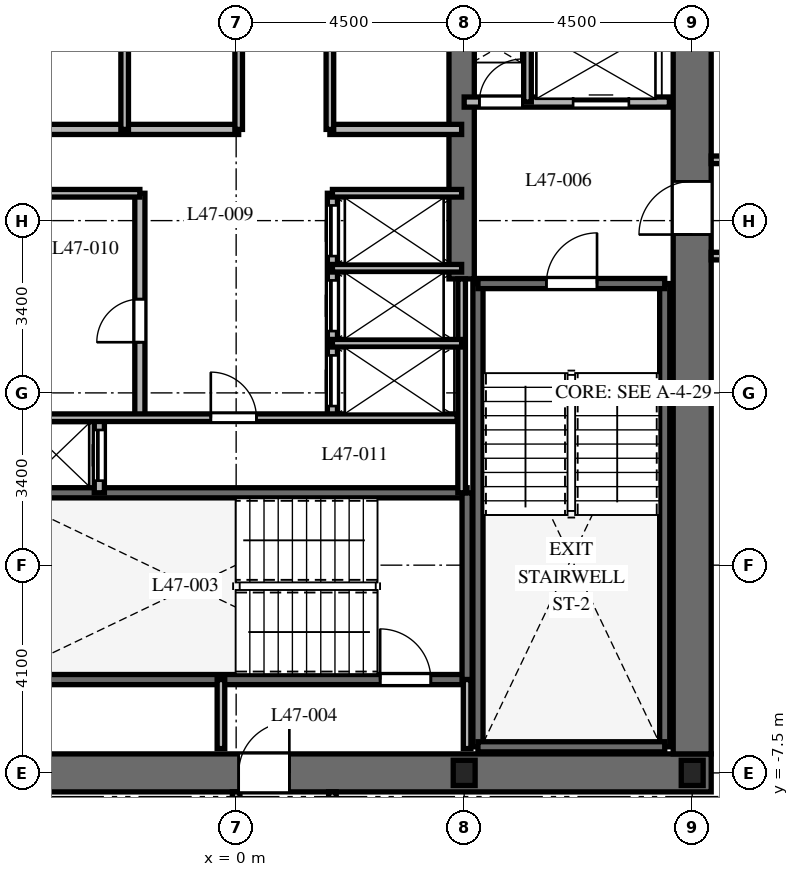
"""IFC4 building model, lengths in metres.
Left out: names, types, materials, properties, quantities, classifications, styles, units other than length and angle.
Written with IfcOpenShell. Run it as: python <this file> out.ifc"""

import sys

from ifc_helpers import new_model, si_unit, direction, frame, frame_2d, origin, origin_2d, place, context, subcontext, project, spatial, rectangle, i_section, extrude, element, fill, save


model = new_model("IFC4")
c1 = context("Model", 3, precision=1e-05, world=origin(), true_north=direction((0.0, 1.0)))
c2 = subcontext(c1, "Body", "Model", "MODEL_VIEW")
j1 = project(units=[si_unit("LENGTHUNIT", "METRE"), si_unit("PLANEANGLEUNIT", "RADIAN")], contexts=[c1])
p1 = place(None, origin())
s1 = spatial("IfcSite", under=j1, at=p1, CompositionType="ELEMENT")
p2 = place(p1, origin())
s2 = spatial("IfcBuilding", under=s1, at=p2, CompositionType="ELEMENT")
p3 = place(p2, frame((0.0, 0.0, 190.4)))
s3 = spatial("IfcBuildingStorey", under=s2, at=p3, CompositionType="ELEMENT", Elevation=190.4)
p4 = place(p3, frame((-9.375, -7.5, 0.0), z_axis=(0.0, 0.0, 1.0), x_axis=(1.0, 0.0, 0.0)))
e1 = element("IfcWall", 1, at=p4, inside=s3, PredefinedType="SHEAR", context=c2, shape_type="SweptSolid", body=[
    extrude(rectangle(XDim=18.75, YDim=0.75, at=frame_2d((9.375, 0.0))), origin(), (0.0, 0.0, 1.0), 3.7),
])
p5 = place(p4, frame((9.425, 0.0, 0.0)))
e2 = element("IfcOpeningElement", 2, at=p5, cuts=e1, PredefinedType="OPENING", context=c2, shape_type="SweptSolid", body=[
    extrude(rectangle(XDim=1.0, YDim=2.15, at=frame_2d((0.5, 1.075))), frame((0.0, 0.385, 0.0), z_axis=(0.0, -1.0, 0.0), x_axis=(1.0, 0.0, 0.0)), (0.0, 0.0, 1.0), 0.77),
])
p6 = place(p3, frame((9.0, -7.125, 0.0), z_axis=(0.0, 0.0, 1.0), x_axis=(0.0, 1.0, 0.0)))
e3 = element("IfcWall", 3, at=p6, inside=s3, PredefinedType="SHEAR", context=c2, shape_type="SweptSolid", body=[
    extrude(rectangle(XDim=14.25, YDim=0.75, at=frame_2d((7.125, 0.0))), origin(), (0.0, 0.0, 1.0), 3.7),
])
p7 = place(p6, frame((10.25, 0.0, 0.0)))
e4 = element("IfcOpeningElement", 4, at=p7, cuts=e3, PredefinedType="OPENING", context=c2, shape_type="SweptSolid", body=[
    extrude(rectangle(XDim=1.05, YDim=2.15, at=frame_2d((0.525, 1.075))), frame((0.0, 0.385, 0.0), z_axis=(0.0, -1.0, 0.0), x_axis=(1.0, 0.0, 0.0)), (0.0, 0.0, 1.0), 0.77),
])
p8 = place(p3, frame((4.45, 2.25, 0.0), z_axis=(0.0, 0.0, 1.0), x_axis=(0.0, 1.0, 0.0)))
e5 = element("IfcWall", 5, at=p8, inside=s3, PredefinedType="SHEAR", context=c2, shape_type="SweptSolid", body=[
    extrude(rectangle(XDim=4.875, YDim=0.5, at=frame_2d((2.438, 0.0))), origin(), (0.0, 0.0, 1.0), 3.7),
])
for number, where, z_axis, x_axis in (
    (6, (4.772, -6.985, 0.0), (0.0, 0.0, 1.0), (0.0, 1.0, 0.0)),
    (7, (8.458, -6.985, 0.0), (0.0, 0.0, 1.0), (0.0, 1.0, 0.0)),
):
    element("IfcWall", number, at=place(p3, frame(where, z_axis=z_axis, x_axis=x_axis)), inside=s3, PredefinedType="SHEAR", context=c2, shape_type="SweptSolid", body=[
        extrude(rectangle(XDim=9.143, YDim=0.2, at=frame_2d((4.572, 0.0))), origin(), (0.0, 0.0, 1.0), 3.7),
    ])
p9 = place(p3, frame((4.772, -6.985, 0.0), z_axis=(0.0, 0.0, 1.0), x_axis=(1.0, 0.0, 0.0)))
e8 = element("IfcWall", 8, at=p9, inside=s3, PredefinedType="SHEAR", context=c2, shape_type="SweptSolid", body=[
    extrude(rectangle(XDim=3.686, YDim=0.2, at=frame_2d((1.843, 0.0))), origin(), (0.0, 0.0, 1.0), 3.7),
])
p10 = place(p3, frame((4.772, 2.158, 0.0), z_axis=(0.0, 0.0, 1.0), x_axis=(1.0, 0.0, 0.0)))
e9 = element("IfcWall", 9, at=p10, inside=s3, PredefinedType="SHEAR", context=c2, shape_type="SweptSolid", body=[
    extrude(rectangle(XDim=3.686, YDim=0.2, at=frame_2d((1.843, 0.0))), origin(), (0.0, 0.0, 1.0), 3.7),
])
p11 = place(p10, frame((1.35, 0.0, 0.0)))
e10 = element("IfcOpeningElement", 10, at=p11, cuts=e9, PredefinedType="OPENING", context=c2, shape_type="SweptSolid", body=[
    extrude(rectangle(XDim=1.0, YDim=2.15, at=frame_2d((0.5, 1.075))), frame((0.0, 0.11, 0.0), z_axis=(0.0, -1.0, 0.0), x_axis=(1.0, 0.0, 0.0)), (0.0, 0.0, 1.0), 0.22),
])
p12 = place(p3, frame((-4.608, -5.658, 0.0), z_axis=(0.0, 0.0, 1.0), x_axis=(1.0, 0.0, 0.0)))
e11 = element("IfcWall", 11, at=p12, inside=s3, PredefinedType="SHEAR", context=c2, shape_type="SweptSolid", body=[
    extrude(rectangle(XDim=9.166, YDim=0.2, at=frame_2d((4.583, 0.0))), origin(), (0.0, 0.0, 1.0), 3.7),
])
p13 = place(p12, frame((7.45, 0.0, 0.0)))
e12 = element("IfcOpeningElement", 12, at=p13, cuts=e11, PredefinedType="OPENING", context=c2, shape_type="SweptSolid", body=[
    extrude(rectangle(XDim=1.0, YDim=2.15, at=frame_2d((0.5, 1.075))), frame((0.0, 0.11, 0.0), z_axis=(0.0, -1.0, 0.0), x_axis=(1.0, 0.0, 0.0)), (0.0, 0.0, 1.0), 0.22),
])
p14 = place(p3, frame((-4.608, -1.972, 0.0), z_axis=(0.0, 0.0, 1.0), x_axis=(1.0, 0.0, 0.0)))
e13 = element("IfcWall", 13, at=p14, inside=s3, PredefinedType="SHEAR", context=c2, shape_type="SweptSolid", body=[
    extrude(rectangle(XDim=9.166, YDim=0.2, at=frame_2d((4.583, 0.0))), origin(), (0.0, 0.0, 1.0), 3.7),
])
p15 = place(p3, frame((4.558, -5.658, 0.0), z_axis=(0.0, 0.0, 1.0), x_axis=(0.0, 1.0, 0.0)))
e14 = element("IfcWall", 14, at=p15, inside=s3, PredefinedType="SHEAR", context=c2, shape_type="SweptSolid", body=[
    extrude(rectangle(XDim=3.686, YDim=0.2, at=frame_2d((1.843, 0.0))), origin(), (0.0, 0.0, 1.0), 3.7),
])
for number, where, z_axis, x_axis in (
    (15, (4.5, -7.5, 0.0), (0.0, 0.0, 1.0), (1.0, 0.0, 0.0)),
    (16, (9.0, -7.5, 0.0), (0.0, 0.0, 1.0), (1.0, 0.0, 0.0)),
):
    element("IfcColumn", number, at=place(p3, frame(where, z_axis=z_axis, x_axis=x_axis)), inside=s3, PredefinedType="COLUMN", context=c2, shape_type="SweptSolid", body=[
        extrude(i_section(OverallWidth=0.432, OverallDepth=0.498, WebThickness=0.056, FlangeThickness=0.089, at=origin_2d()), origin(), (0.0, 0.0, 1.0), 3.7),
    ])
for number, where, z_axis, x_axis in (
    (17, (-0.3, -7.02, 0.0), (0.0, 0.0, 1.0), (0.0, 1.0, 0.0)),
    (18, (4.558, -7.02, 0.0), (0.0, 0.0, 1.0), (0.0, 1.0, 0.0)),
):
    element("IfcWall", number, at=place(p3, frame(where, z_axis=z_axis, x_axis=x_axis)), inside=s3, PredefinedType="PARTITIONING", context=c2, shape_type="SweptSolid", body=[
        extrude(rectangle(XDim=1.362, YDim=0.15, at=frame_2d((0.681, 0.0))), origin(), (0.0, 0.0, 1.0), 3.4),
    ])
p16 = place(p3, frame((4.5, 5.74, 0.0), z_axis=(0.0, 0.0, 1.0), x_axis=(1.0, 0.0, 0.0)))
e19 = element("IfcWall", 19, at=p16, inside=s3, PredefinedType="PARTITIONING", context=c2, shape_type="SweptSolid", body=[
    extrude(rectangle(XDim=4.05, YDim=0.2, at=frame_2d((2.025, 0.0))), origin(), (0.0, 0.0, 1.0), 3.4),
])
p17 = place(p16, frame((0.3, 0.0, 0.0)))
e20 = element("IfcOpeningElement", 20, at=p17, cuts=e19, PredefinedType="OPENING", context=c2, shape_type="SweptSolid", body=[
    extrude(rectangle(XDim=0.85, YDim=2.03, at=frame_2d((0.425, 1.015))), frame((0.0, 0.11, 0.0), z_axis=(0.0, -1.0, 0.0), x_axis=(1.0, 0.0, 0.0)), (0.0, 0.0, 1.0), 0.22),
])
p18 = place(p16, frame((2.15, 0.0, 0.0)))
e21 = element("IfcOpeningElement", 21, at=p18, cuts=e19, PredefinedType="OPENING", context=c2, shape_type="SweptSolid", body=[
    extrude(rectangle(XDim=1.1, YDim=2.2, at=frame_2d((0.55, 1.1))), frame((0.0, 0.11, 0.0), z_axis=(0.0, -1.0, 0.0), x_axis=(1.0, 0.0, 0.0)), (0.0, 0.0, 1.0), 0.22),
])
p19 = place(p3, frame((5.75, 5.74, 0.0), z_axis=(0.0, 0.0, 1.0), x_axis=(0.0, 1.0, 0.0)))
e22 = element("IfcWall", 22, at=p19, inside=s3, PredefinedType="PARTITIONING", context=c2, shape_type="SweptSolid", body=[
    extrude(rectangle(XDim=1.41, YDim=0.15, at=frame_2d((0.705, 0.0))), origin(), (0.0, 0.0, 1.0), 3.4),
])
p20 = place(p3, frame((-2.7, -1.972, 0.0), z_axis=(0.0, 0.0, 1.0), x_axis=(0.0, 1.0, 0.0)))
e23 = element("IfcWall", 23, at=p20, inside=s3, PredefinedType="PARTITIONING", context=c2, shape_type="SweptSolid", body=[
    extrude(rectangle(XDim=1.472, YDim=0.2, at=frame_2d((0.736, 0.0))), origin(), (0.0, 0.0, 1.0), 3.4),
])
p21 = place(p20, frame((0.24, 0.0, 0.0)))
e24 = element("IfcOpeningElement", 24, at=p21, cuts=e23, PredefinedType="OPENING", context=c2, shape_type="SweptSolid", body=[
    extrude(rectangle(XDim=1.0, YDim=2.2, at=frame_2d((0.5, 1.1))), frame((0.0, 0.11, 0.0), z_axis=(0.0, -1.0, 0.0), x_axis=(1.0, 0.0, 0.0)), (0.0, 0.0, 1.0), 0.22),
])
p22 = place(p3, frame((-4.45, 5.2, 0.0), z_axis=(0.0, 0.0, 1.0), x_axis=(1.0, 0.0, 0.0)))
e25 = element("IfcWall", 25, at=p22, inside=s3, PredefinedType="PARTITIONING", context=c2, shape_type="SweptSolid", body=[
    extrude(rectangle(XDim=4.5, YDim=0.2, at=frame_2d((2.25, 0.0))), origin(), (0.0, 0.0, 1.0), 3.4),
])
p23 = place(p3, frame((1.85, 5.2, 0.0), z_axis=(0.0, 0.0, 1.0), x_axis=(1.0, 0.0, 0.0)))
e26 = element("IfcWall", 26, at=p23, inside=s3, PredefinedType="PARTITIONING", context=c2, shape_type="SweptSolid", body=[
    extrude(rectangle(XDim=2.6, YDim=0.2, at=frame_2d((1.3, 0.0))), origin(), (0.0, 0.0, 1.0), 3.4),
])
p24 = place(p3, frame((-2.2, 5.2, 0.0), z_axis=(0.0, 0.0, 1.0), x_axis=(0.0, 1.0, 0.0)))
e27 = element("IfcWall", 27, at=p24, inside=s3, PredefinedType="PARTITIONING", context=c2, shape_type="SweptSolid", body=[
    extrude(rectangle(XDim=1.85, YDim=0.15, at=frame_2d((0.925, 0.0))), origin(), (0.0, 0.0, 1.0), 3.4),
])
for number, where, z_axis, x_axis in (
    (28, (0.05, 5.2, 0.0), (0.0, 0.0, 1.0), (0.0, 1.0, 0.0)),
    (29, (1.85, 5.2, 0.0), (0.0, 0.0, 1.0), (0.0, 1.0, 0.0)),
):
    element("IfcWall", number, at=place(p3, frame(where, z_axis=z_axis, x_axis=x_axis)), inside=s3, PredefinedType="PARTITIONING", context=c2, shape_type="SweptSolid", body=[
        extrude(rectangle(XDim=1.95, YDim=0.15, at=frame_2d((0.975, 0.0))), origin(), (0.0, 0.0, 1.0), 3.4),
    ])
p25 = place(p3, frame((4.45, -1.972, 0.0), z_axis=(0.0, 0.0, 1.0), x_axis=(0.0, 1.0, 0.0)))
e30 = element("IfcWall", 30, at=p25, inside=s3, PredefinedType="PARTITIONING", context=c2, shape_type="SweptSolid", body=[
    extrude(rectangle(XDim=4.222, YDim=0.15, at=frame_2d((2.111, 0.0))), origin(), (0.0, 0.0, 1.0), 3.4),
])
p26 = place(p3, frame((-1.9, -0.5, 0.0), z_axis=(0.0, 0.0, 1.0), x_axis=(0.0, 1.0, 0.0)))
e31 = element("IfcWall", 31, at=p26, inside=s3, PredefinedType="PARTITIONING", context=c2, shape_type="SweptSolid", body=[
    extrude(rectangle(XDim=4.44, YDim=0.2, at=frame_2d((2.22, 0.0))), origin(), (0.0, 0.0, 1.0), 3.4),
])
p27 = place(p26, frame((1.5, 0.0, 0.0)))
e32 = element("IfcOpeningElement", 32, at=p27, cuts=e31, PredefinedType="OPENING", context=c2, shape_type="SweptSolid", body=[
    extrude(rectangle(XDim=0.85, YDim=2.03, at=frame_2d((0.425, 1.015))), frame((0.0, 0.11, 0.0), z_axis=(0.0, -1.0, 0.0), x_axis=(1.0, 0.0, 0.0)), (0.0, 0.0, 1.0), 0.22),
])
p28 = place(p3, frame((-4.45, 3.94, 0.0), z_axis=(0.0, 0.0, 1.0), x_axis=(1.0, 0.0, 0.0)))
e33 = element("IfcWall", 33, at=p28, inside=s3, PredefinedType="PARTITIONING", context=c2, shape_type="SweptSolid", body=[
    extrude(rectangle(XDim=2.55, YDim=0.15, at=frame_2d((1.275, 0.0))), origin(), (0.0, 0.0, 1.0), 3.4),
])
p29 = place(p3, frame((1.9, -0.5, 0.0), z_axis=(0.0, 0.0, 1.0), x_axis=(0.0, 1.0, 0.0)))
e34 = element("IfcWall", 34, at=p29, inside=s3, PredefinedType="PARTITIONING", context=c2, shape_type="SweptSolid", body=[
    extrude(rectangle(XDim=4.44, YDim=0.2, at=frame_2d((2.22, 0.0))), origin(), (0.0, 0.0, 1.0), 3.4),
])
p30 = place(p29, frame((0.24, 0.0, 0.0)))
e35 = element("IfcOpeningElement", 35, at=p30, cuts=e34, PredefinedType="OPENING", context=c2, shape_type="SweptSolid", body=[
    extrude(rectangle(XDim=1.0, YDim=2.2, at=frame_2d((0.5, 1.1))), frame((0.0, 0.11, 0.0), z_axis=(0.0, -1.0, 0.0), x_axis=(1.0, 0.0, 0.0)), (0.0, 0.0, 1.0), 0.22),
])
p31 = place(p29, frame((1.72, 0.0, 0.0)))
e36 = element("IfcOpeningElement", 36, at=p31, cuts=e34, PredefinedType="OPENING", context=c2, shape_type="SweptSolid", body=[
    extrude(rectangle(XDim=1.0, YDim=2.2, at=frame_2d((0.5, 1.1))), frame((0.0, 0.11, 0.0), z_axis=(0.0, -1.0, 0.0), x_axis=(1.0, 0.0, 0.0)), (0.0, 0.0, 1.0), 0.22),
])
p32 = place(p29, frame((3.2, 0.0, 0.0)))
e37 = element("IfcOpeningElement", 37, at=p32, cuts=e34, PredefinedType="OPENING", context=c2, shape_type="SweptSolid", body=[
    extrude(rectangle(XDim=1.0, YDim=2.2, at=frame_2d((0.5, 1.1))), frame((0.0, 0.11, 0.0), z_axis=(0.0, -1.0, 0.0), x_axis=(1.0, 0.0, 0.0)), (0.0, 0.0, 1.0), 0.22),
])
for number, where, z_axis, x_axis in (
    (38, (1.9, 3.94, 0.0), (0.0, 0.0, 1.0), (1.0, 0.0, 0.0)),
    (39, (1.9, 0.98, 0.0), (0.0, 0.0, 1.0), (1.0, 0.0, 0.0)),
    (40, (1.9, 2.46, 0.0), (0.0, 0.0, 1.0), (1.0, 0.0, 0.0)),
):
    element("IfcWall", number, at=place(p3, frame(where, z_axis=z_axis, x_axis=x_axis)), inside=s3, PredefinedType="PARTITIONING", context=c2, shape_type="SweptSolid", body=[
        extrude(rectangle(XDim=2.55, YDim=0.15, at=frame_2d((1.275, 0.0))), origin(), (0.0, 0.0, 1.0), 3.4),
    ])
p33 = place(p3, frame((-4.36, -0.49, 0.0), z_axis=(0.0, 0.0, 1.0), x_axis=(1.0, 0.0, 0.0)))
e41 = element("IfcWall", 41, at=p33, inside=s3, PredefinedType="PARTITIONING", context=c2, shape_type="SweptSolid", body=[
    extrude(rectangle(XDim=8.72, YDim=0.15, at=frame_2d((4.36, 0.0))), origin(), (0.0, 0.0, 1.0), 3.4),
])
p34 = place(p33, frame((3.86, 0.0, 0.0)))
e42 = element("IfcOpeningElement", 42, at=p34, cuts=e41, PredefinedType="OPENING", context=c2, shape_type="SweptSolid", body=[
    extrude(rectangle(XDim=0.9, YDim=2.03, at=frame_2d((0.45, 1.015))), frame((0.0, 0.085, 0.0), z_axis=(0.0, -1.0, 0.0), x_axis=(1.0, 0.0, 0.0)), (0.0, 0.0, 1.0), 0.17),
])
p35 = place(p3, frame((11.55, 2.7, 0.0), z_axis=(0.0, 0.0, 1.0), x_axis=(-1.0, 0.0, 0.0)))
e43 = element("IfcWall", 43, at=p35, inside=s3, PredefinedType="PARTITIONING", context=c2, shape_type="SweptSolid", body=[
    extrude(rectangle(XDim=2.175, YDim=0.15, at=frame_2d((1.087, 0.0))), origin(), (0.0, 0.0, 1.0), 3.4),
])
p36 = place(p3, frame((9.375, 4.6, 0.0), z_axis=(0.0, 0.0, 1.0), x_axis=(1.0, 0.0, 0.0)))
e44 = element("IfcWall", 44, at=p36, inside=s3, PredefinedType="PARTITIONING", context=c2, shape_type="SweptSolid", body=[
    extrude(rectangle(XDim=2.175, YDim=0.15, at=frame_2d((1.087, 0.0))), origin(), (0.0, 0.0, 1.0), 3.4),
])
p37 = place(p36, frame((0.663, 0.0, 0.0)))
e45 = element("IfcOpeningElement", 45, at=p37, cuts=e44, PredefinedType="OPENING", context=c2, shape_type="SweptSolid", body=[
    extrude(rectangle(XDim=0.85, YDim=2.03, at=frame_2d((0.425, 1.015))), frame((0.0, 0.085, 0.0), z_axis=(0.0, -1.0, 0.0), x_axis=(1.0, 0.0, 0.0)), (0.0, 0.0, 1.0), 0.17),
])
for number, where, z_axis, x_axis in (
    (46, (0.0, -10.05, 0.0), (0.0, 0.0, 1.0), (0.0, 1.0, 0.0)),
    (47, (1.9, -7.875, 0.0), (0.0, 0.0, 1.0), (0.0, -1.0, 0.0)),
):
    element("IfcWall", number, at=place(p3, frame(where, z_axis=z_axis, x_axis=x_axis)), inside=s3, PredefinedType="PARTITIONING", context=c2, shape_type="SweptSolid", body=[
        extrude(rectangle(XDim=2.175, YDim=0.15, at=frame_2d((1.087, 0.0))), origin(), (0.0, 0.0, 1.0), 3.4),
    ])
p38 = place(p11, origin())
e48 = element("IfcDoor", 48, at=p38, inside=s3, OperationType="SINGLE_SWING_RIGHT", PredefinedType="DOOR", context=c2, shape_type="SweptSolid", body=[
    extrude(rectangle(XDim=1.0, YDim=2.15, at=frame_2d((0.5, 1.075))), frame((0.0, 0.025, 0.0), z_axis=(0.0, -1.0, 0.0), x_axis=(1.0, 0.0, 0.0)), (0.0, 0.0, 1.0), 0.05),
])
fill(e10, e48)
p39 = place(p13, origin())
e49 = element("IfcDoor", 49, at=p39, inside=s3, OperationType="SINGLE_SWING_LEFT", PredefinedType="DOOR", context=c2, shape_type="SweptSolid", body=[
    extrude(rectangle(XDim=1.0, YDim=2.15, at=frame_2d((0.5, 1.075))), frame((0.0, 0.025, 0.0), z_axis=(0.0, -1.0, 0.0), x_axis=(1.0, 0.0, 0.0)), (0.0, 0.0, 1.0), 0.05),
])
fill(e12, e49)
p40 = place(p5, origin())
e50 = element("IfcDoor", 50, at=p40, inside=s3, OperationType="SINGLE_SWING_RIGHT", PredefinedType="DOOR", context=c2, shape_type="SweptSolid", body=[
    extrude(rectangle(XDim=1.0, YDim=2.15, at=frame_2d((0.5, 1.075))), frame((0.0, 0.025, 0.0), z_axis=(0.0, -1.0, 0.0), x_axis=(1.0, 0.0, 0.0)), (0.0, 0.0, 1.0), 0.05),
])
fill(e2, e50)
p41 = place(p7, origin())
e51 = element("IfcDoor", 51, at=p41, inside=s3, OperationType="SINGLE_SWING_LEFT", PredefinedType="DOOR", context=c2, shape_type="SweptSolid", body=[
    extrude(rectangle(XDim=1.05, YDim=2.15, at=frame_2d((0.525, 1.075))), frame((0.0, 0.025, 0.0), z_axis=(0.0, -1.0, 0.0), x_axis=(1.0, 0.0, 0.0)), (0.0, 0.0, 1.0), 0.05),
])
fill(e4, e51)
p42 = place(p17, origin())
e52 = element("IfcDoor", 52, at=p42, inside=s3, OperationType="SINGLE_SWING_RIGHT", PredefinedType="DOOR", context=c2, shape_type="SweptSolid", body=[
    extrude(rectangle(XDim=0.85, YDim=2.03, at=frame_2d((0.425, 1.015))), frame((0.0, 0.025, 0.0), z_axis=(0.0, -1.0, 0.0), x_axis=(1.0, 0.0, 0.0)), (0.0, 0.0, 1.0), 0.05),
])
fill(e20, e52)
p43 = place(p18, origin())
e53 = element("IfcDoor", 53, at=p43, inside=s3, OperationType="SLIDING_TO_RIGHT", PredefinedType="DOOR", context=c2, shape_type="SweptSolid", body=[
    extrude(rectangle(XDim=1.1, YDim=2.2, at=frame_2d((0.55, 1.1))), frame((0.0, 0.025, 0.0), z_axis=(0.0, -1.0, 0.0), x_axis=(1.0, 0.0, 0.0)), (0.0, 0.0, 1.0), 0.05),
])
fill(e21, e53)
p44 = place(p21, origin())
e54 = element("IfcDoor", 54, at=p44, inside=s3, OperationType="SLIDING_TO_LEFT", PredefinedType="DOOR", context=c2, shape_type="SweptSolid", body=[
    extrude(rectangle(XDim=1.0, YDim=2.2, at=frame_2d((0.5, 1.1))), frame((0.0, 0.025, 0.0), z_axis=(0.0, -1.0, 0.0), x_axis=(1.0, 0.0, 0.0)), (0.0, 0.0, 1.0), 0.05),
])
fill(e24, e54)
p45 = place(p27, origin())
e55 = element("IfcDoor", 55, at=p45, inside=s3, OperationType="SINGLE_SWING_LEFT", PredefinedType="DOOR", context=c2, shape_type="SweptSolid", body=[
    extrude(rectangle(XDim=0.85, YDim=2.03, at=frame_2d((0.425, 1.015))), frame((0.0, 0.025, 0.0), z_axis=(0.0, -1.0, 0.0), x_axis=(1.0, 0.0, 0.0)), (0.0, 0.0, 1.0), 0.05),
])
fill(e32, e55)
p46 = place(p30, origin())
e56 = element("IfcDoor", 56, at=p46, inside=s3, OperationType="SLIDING_TO_RIGHT", PredefinedType="DOOR", context=c2, shape_type="SweptSolid", body=[
    extrude(rectangle(XDim=1.0, YDim=2.2, at=frame_2d((0.5, 1.1))), frame((0.0, 0.025, 0.0), z_axis=(0.0, -1.0, 0.0), x_axis=(1.0, 0.0, 0.0)), (0.0, 0.0, 1.0), 0.05),
])
fill(e35, e56)
p47 = place(p31, origin())
e57 = element("IfcDoor", 57, at=p47, inside=s3, OperationType="SLIDING_TO_RIGHT", PredefinedType="DOOR", context=c2, shape_type="SweptSolid", body=[
    extrude(rectangle(XDim=1.0, YDim=2.2, at=frame_2d((0.5, 1.1))), frame((0.0, 0.025, 0.0), z_axis=(0.0, -1.0, 0.0), x_axis=(1.0, 0.0, 0.0)), (0.0, 0.0, 1.0), 0.05),
])
fill(e36, e57)
p48 = place(p32, origin())
e58 = element("IfcDoor", 58, at=p48, inside=s3, OperationType="SLIDING_TO_RIGHT", PredefinedType="DOOR", context=c2, shape_type="SweptSolid", body=[
    extrude(rectangle(XDim=1.0, YDim=2.2, at=frame_2d((0.5, 1.1))), frame((0.0, 0.025, 0.0), z_axis=(0.0, -1.0, 0.0), x_axis=(1.0, 0.0, 0.0)), (0.0, 0.0, 1.0), 0.05),
])
fill(e37, e58)
p49 = place(p34, origin())
e59 = element("IfcDoor", 59, at=p49, inside=s3, OperationType="SINGLE_SWING_LEFT", PredefinedType="DOOR", context=c2, shape_type="SweptSolid", body=[
    extrude(rectangle(XDim=0.9, YDim=2.03, at=frame_2d((0.45, 1.015))), frame((0.0, 0.025, 0.0), z_axis=(0.0, -1.0, 0.0), x_axis=(1.0, 0.0, 0.0)), (0.0, 0.0, 1.0), 0.05),
])
fill(e42, e59)
save(model, sys.argv[1])
